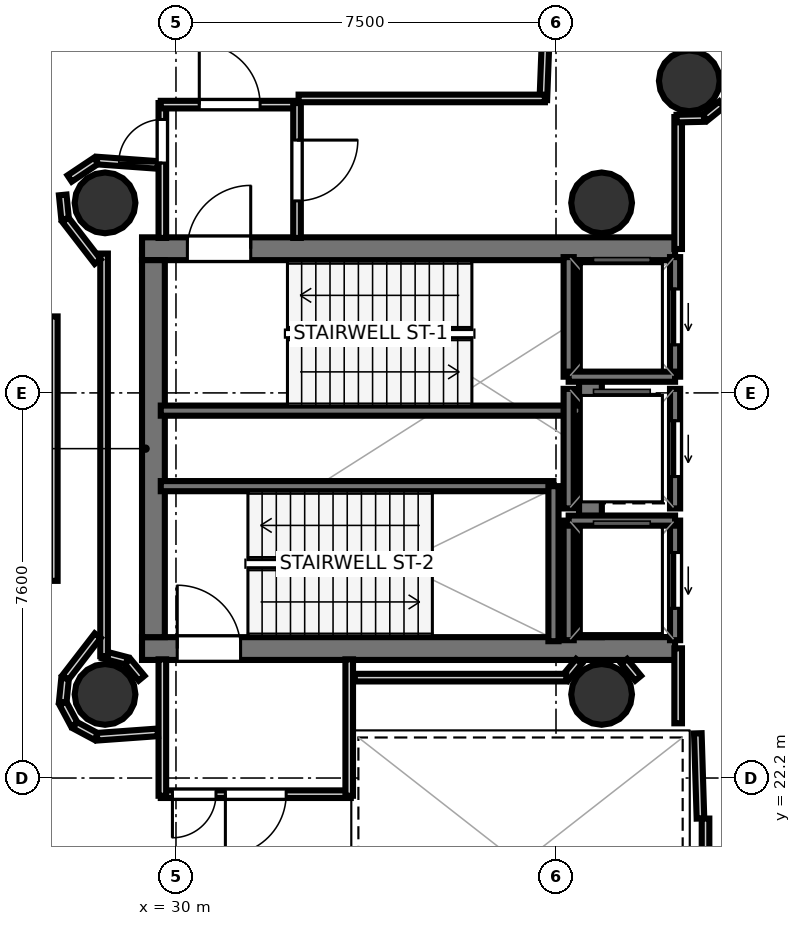
"""IFC4 building model, lengths in metres.
Left out: names, types, materials, properties, quantities, classifications, styles, units other than length and angle.
Written with IfcOpenShell. Run it as: python <this file> out.ifc"""

import sys

from ifc_helpers import new_model, si_unit, direction, frame, frame_2d, origin, origin_2d, place, context, subcontext, project, spatial, rectangle, hollow_circle, extrude, element, fill, save


model = new_model("IFC4")
c1 = context("Model", 3, precision=1e-05, world=origin(), true_north=direction((0.0, 1.0)))
c2 = subcontext(c1, "Body", "Model", "MODEL_VIEW")
j1 = project(units=[si_unit("LENGTHUNIT", "METRE"), si_unit("PLANEANGLEUNIT", "RADIAN")], contexts=[c1])
p1 = place(None, origin())
s1 = spatial("IfcSite", under=j1, at=p1, CompositionType="ELEMENT")
p2 = place(p1, origin())
s2 = spatial("IfcBuilding", under=s1, at=p2, CompositionType="ELEMENT")
p3 = place(p2, frame((0.0, 0.0, 229.9)))
s3 = spatial("IfcBuildingStorey", under=s2, at=p3, CompositionType="ELEMENT", Elevation=229.9)
p4 = place(p3, frame((29.33, 32.645, 0.0), z_axis=(0.0, 0.0, 1.0), x_axis=(1.0, 0.0, 0.0)))
e1 = element("IfcWall", 1, at=p4, inside=s3, PredefinedType="SHEAR", context=c2, shape_type="SweptSolid", body=[
    extrude(rectangle(XDim=10.52, YDim=0.45, at=frame_2d((5.26, 0.0))), origin(), (0.0, 0.0, 1.0), 4.38),
])
p5 = place(p4, frame((0.895, 0.0, 0.0)))
e2 = element("IfcOpeningElement", 2, at=p5, cuts=e1, PredefinedType="OPENING", context=c2, shape_type="SweptSolid", body=[
    extrude(rectangle(XDim=1.25, YDim=2.15, at=frame_2d((0.625, 1.075))), frame((0.0, 0.235, 0.0), z_axis=(0.0, -1.0, 0.0), x_axis=(1.0, 0.0, 0.0)), (0.0, 0.0, 1.0), 0.47),
])
p6 = place(p3, frame((29.33, 24.755, 0.0), z_axis=(0.0, 0.0, 1.0), x_axis=(1.0, 0.0, 0.0)))
e3 = element("IfcWall", 3, at=p6, inside=s3, PredefinedType="SHEAR", context=c2, shape_type="SweptSolid", body=[
    extrude(rectangle(XDim=10.52, YDim=0.45, at=frame_2d((5.26, 0.0))), origin(), (0.0, 0.0, 1.0), 4.38),
])
p7 = place(p6, frame((0.695, 0.0, 0.0)))
e4 = element("IfcOpeningElement", 4, at=p7, cuts=e3, PredefinedType="OPENING", context=c2, shape_type="SweptSolid", body=[
    extrude(rectangle(XDim=1.25, YDim=2.15, at=frame_2d((0.625, 1.075))), frame((0.0, 0.235, 0.0), z_axis=(0.0, -1.0, 0.0), x_axis=(1.0, 0.0, 0.0)), (0.0, 0.0, 1.0), 0.47),
])
for number, where, z_axis, x_axis in (
    (5, (29.555, 24.98, 0.0), (0.0, 0.0, 1.0), (0.0, 1.0, 0.0)),
    (6, (38.18, 24.98, 0.0), (0.0, 0.0, 1.0), (0.0, 1.0, 0.0)),
):
    element("IfcWall", number, at=place(p3, frame(where, z_axis=z_axis, x_axis=x_axis)), inside=s3, PredefinedType="SHEAR", context=c2, shape_type="SweptSolid", body=[
        extrude(rectangle(XDim=7.44, YDim=0.45, at=frame_2d((3.72, 0.0))), origin(), (0.0, 0.0, 1.0), 4.38),
    ])
for number, where, z_axis, x_axis in (
    (7, (28.6, 33.55, 0.0), (0.0, 0.0, 1.0), (1.0, 0.0, 0.0)),
    (8, (28.6, 23.85, 0.0), (0.0, 0.0, 1.0), (1.0, 0.0, 0.0)),
    (9, (38.4, 33.55, 0.0), (0.0, 0.0, 1.0), (1.0, 0.0, 0.0)),
    (10, (38.4, 23.85, 0.0), (0.0, 0.0, 1.0), (1.0, 0.0, 0.0)),
    (11, (40.131, 35.958, 0.0), (0.0, 0.0, 1.0), (1.0, 0.0, 0.0)),
):
    element("IfcColumn", number, at=place(p3, frame(where, z_axis=z_axis, x_axis=x_axis)), inside=s3, PredefinedType="COLUMN", context=c2, shape_type="SweptSolid", body=[
        extrude(hollow_circle(Radius=0.6, WallThickness=0.03, at=origin_2d()), origin(), (0.0, 0.0, 1.0), 4.6),
    ])
p8 = place(p3, frame((29.7, 29.45, 0.0), z_axis=(0.0, 0.0, 1.0), x_axis=(1.0, 0.0, 0.0)))
e12 = element("IfcWall", 12, at=p8, inside=s3, PredefinedType="SOLIDWALL", context=c2, shape_type="SweptSolid", body=[
    extrude(rectangle(XDim=8.3, YDim=0.2, at=frame_2d((4.15, 0.0))), origin(), (0.0, 0.0, 1.0), 4.38),
])
p9 = place(p3, frame((29.7, 27.96, 0.0), z_axis=(0.0, 0.0, 1.0), x_axis=(1.0, 0.0, 0.0)))
e13 = element("IfcWall", 13, at=p9, inside=s3, PredefinedType="SOLIDWALL", context=c2, shape_type="SweptSolid", body=[
    extrude(rectangle(XDim=7.75, YDim=0.2, at=frame_2d((3.875, 0.0))), origin(), (0.0, 0.0, 1.0), 4.38),
])
p10 = place(p3, frame((37.45, 24.9, 0.0), z_axis=(0.0, 0.0, 1.0), x_axis=(0.0, 1.0, 0.0)))
e14 = element("IfcWall", 14, at=p10, inside=s3, PredefinedType="SOLIDWALL", context=c2, shape_type="SweptSolid", body=[
    extrude(rectangle(XDim=3.06, YDim=0.2, at=frame_2d((1.53, 0.0))), origin(), (0.0, 0.0, 1.0), 4.38),
])
p11 = place(p3, frame((39.85, 30.12, 0.0), z_axis=(0.0, 0.0, 1.0), x_axis=(0.0, 1.0, 0.0)))
e15 = element("IfcWall", 15, at=p11, inside=s3, PredefinedType="SOLIDWALL", context=c2, shape_type="SweptSolid", body=[
    extrude(rectangle(XDim=2.36, YDim=0.2, at=frame_2d((1.18, 0.0))), origin(), (0.0, 0.0, 1.0), 4.38),
])
p12 = place(p11, frame((0.63, 0.0, 0.0)))
e16 = element("IfcOpeningElement", 16, at=p12, cuts=e15, PredefinedType="OPENING", context=c2, shape_type="SweptSolid", body=[
    extrude(rectangle(XDim=1.1, YDim=2.15, at=frame_2d((0.55, 1.075))), frame((0.0, 0.11, 0.0), z_axis=(0.0, -1.0, 0.0), x_axis=(1.0, 0.0, 0.0)), (0.0, 0.0, 1.0), 0.22),
])
p13 = place(p3, frame((37.75, 30.12, 0.0), z_axis=(0.0, 0.0, 1.0), x_axis=(0.0, 1.0, 0.0)))
e17 = element("IfcWall", 17, at=p13, inside=s3, PredefinedType="SOLIDWALL", context=c2, shape_type="SweptSolid", body=[
    extrude(rectangle(XDim=2.36, YDim=0.2, at=frame_2d((1.18, 0.0))), origin(), (0.0, 0.0, 1.0), 4.38),
])
p14 = place(p3, frame((37.75, 30.12, 0.0), z_axis=(0.0, 0.0, 1.0), x_axis=(1.0, 0.0, 0.0)))
e18 = element("IfcWall", 18, at=p14, inside=s3, PredefinedType="SOLIDWALL", context=c2, shape_type="SweptSolid", body=[
    extrude(rectangle(XDim=2.1, YDim=0.2, at=frame_2d((1.05, 0.0))), origin(), (0.0, 0.0, 1.0), 4.38),
])
p15 = place(p3, frame((39.85, 24.92, 0.0), z_axis=(0.0, 0.0, 1.0), x_axis=(0.0, 1.0, 0.0)))
e19 = element("IfcWall", 19, at=p15, inside=s3, PredefinedType="SOLIDWALL", context=c2, shape_type="SweptSolid", body=[
    extrude(rectangle(XDim=2.36, YDim=0.2, at=frame_2d((1.18, 0.0))), origin(), (0.0, 0.0, 1.0), 4.38),
])
p16 = place(p15, frame((0.63, 0.0, 0.0)))
e20 = element("IfcOpeningElement", 20, at=p16, cuts=e19, PredefinedType="OPENING", context=c2, shape_type="SweptSolid", body=[
    extrude(rectangle(XDim=1.1, YDim=2.15, at=frame_2d((0.55, 1.075))), frame((0.0, 0.11, 0.0), z_axis=(0.0, -1.0, 0.0), x_axis=(1.0, 0.0, 0.0)), (0.0, 0.0, 1.0), 0.22),
])
p17 = place(p3, frame((37.75, 24.92, 0.0), z_axis=(0.0, 0.0, 1.0), x_axis=(0.0, 1.0, 0.0)))
e21 = element("IfcWall", 21, at=p17, inside=s3, PredefinedType="SOLIDWALL", context=c2, shape_type="SweptSolid", body=[
    extrude(rectangle(XDim=2.36, YDim=0.2, at=frame_2d((1.18, 0.0))), origin(), (0.0, 0.0, 1.0), 4.38),
])
p18 = place(p3, frame((37.75, 27.28, 0.0), z_axis=(0.0, 0.0, 1.0), x_axis=(1.0, 0.0, 0.0)))
e22 = element("IfcWall", 22, at=p18, inside=s3, PredefinedType="SOLIDWALL", context=c2, shape_type="SweptSolid", body=[
    extrude(rectangle(XDim=2.1, YDim=0.2, at=frame_2d((1.05, 0.0))), origin(), (0.0, 0.0, 1.0), 4.38),
])
p19 = place(p3, frame((39.85, 27.52, 0.0), z_axis=(0.0, 0.0, 1.0), x_axis=(0.0, 1.0, 0.0)))
e23 = element("IfcWall", 23, at=p19, inside=s3, PredefinedType="SOLIDWALL", context=c2, shape_type="SweptSolid", body=[
    extrude(rectangle(XDim=2.36, YDim=0.2, at=frame_2d((1.18, 0.0))), origin(), (0.0, 0.0, 1.0), 4.38),
])
p20 = place(p19, frame((0.63, 0.0, 0.0)))
e24 = element("IfcOpeningElement", 24, at=p20, cuts=e23, PredefinedType="OPENING", context=c2, shape_type="SweptSolid", body=[
    extrude(rectangle(XDim=1.1, YDim=2.15, at=frame_2d((0.55, 1.075))), frame((0.0, 0.11, 0.0), z_axis=(0.0, -1.0, 0.0), x_axis=(1.0, 0.0, 0.0)), (0.0, 0.0, 1.0), 0.22),
])
p21 = place(p3, frame((37.75, 27.52, 0.0), z_axis=(0.0, 0.0, 1.0), x_axis=(0.0, 1.0, 0.0)))
e25 = element("IfcWall", 25, at=p21, inside=s3, PredefinedType="SOLIDWALL", context=c2, shape_type="SweptSolid", body=[
    extrude(rectangle(XDim=2.36, YDim=0.2, at=frame_2d((1.18, 0.0))), origin(), (0.0, 0.0, 1.0), 4.38),
])
p22 = place(p3, frame((29.731, 32.858, 0.0), z_axis=(0.0, 0.0, 1.0), x_axis=(0.0, 1.0, 0.0)))
e26 = element("IfcWall", 26, at=p22, inside=s3, PredefinedType="PARTITIONING", context=c2, shape_type="SweptSolid", body=[
    extrude(rectangle(XDim=2.662, YDim=0.15, at=frame_2d((1.331, 0.0))), origin(), (0.0, 0.0, 1.0), 2.9),
])
p23 = place(p22, frame((1.478, 0.0, 0.0)))
e27 = element("IfcOpeningElement", 27, at=p23, cuts=e26, PredefinedType="OPENING", context=c2, shape_type="SweptSolid", body=[
    extrude(rectangle(XDim=0.86, YDim=2.05, at=frame_2d((0.43, 1.025))), frame((0.0, 0.085, 0.0), z_axis=(0.0, -1.0, 0.0), x_axis=(1.0, 0.0, 0.0)), (0.0, 0.0, 1.0), 0.17),
])
p24 = place(p3, frame((29.7, 35.489, 0.0), z_axis=(0.0, 0.0, 1.0), x_axis=(1.0, 0.0, 0.0)))
e28 = element("IfcWall", 28, at=p24, inside=s3, PredefinedType="PARTITIONING", context=c2, shape_type="SweptSolid", body=[
    extrude(rectangle(XDim=2.72, YDim=0.15, at=frame_2d((1.36, 0.0))), origin(), (0.0, 0.0, 1.0), 2.9),
])
p25 = place(p24, frame((0.76, 0.0, 0.0)))
e29 = element("IfcOpeningElement", 29, at=p25, cuts=e28, PredefinedType="OPENING", context=c2, shape_type="SweptSolid", body=[
    extrude(rectangle(XDim=1.2, YDim=2.15, at=frame_2d((0.6, 1.075))), frame((0.0, 0.085, 0.0), z_axis=(0.0, -1.0, 0.0), x_axis=(1.0, 0.0, 0.0)), (0.0, 0.0, 1.0), 0.17),
])
p26 = place(p3, frame((32.389, 35.52, 0.0), z_axis=(0.0, 0.0, 1.0), x_axis=(0.0, -1.0, 0.0)))
e30 = element("IfcWall", 30, at=p26, inside=s3, PredefinedType="PARTITIONING", context=c2, shape_type="SweptSolid", body=[
    extrude(rectangle(XDim=2.662, YDim=0.15, at=frame_2d((1.331, 0.0))), origin(), (0.0, 0.0, 1.0), 2.9),
])
p27 = place(p26, frame((0.731, 0.0, 0.0)))
e31 = element("IfcOpeningElement", 31, at=p27, cuts=e30, PredefinedType="OPENING", context=c2, shape_type="SweptSolid", body=[
    extrude(rectangle(XDim=1.2, YDim=2.15, at=frame_2d((0.6, 1.075))), frame((0.0, 0.085, 0.0), z_axis=(0.0, -1.0, 0.0), x_axis=(1.0, 0.0, 0.0)), (0.0, 0.0, 1.0), 0.17),
])
p28 = place(p3, frame((33.45, 21.881, 0.0), z_axis=(0.0, 0.0, 1.0), x_axis=(-1.0, 0.0, 0.0)))
e32 = element("IfcWall", 32, at=p28, inside=s3, PredefinedType="PARTITIONING", context=c2, shape_type="SweptSolid", body=[
    extrude(rectangle(XDim=3.75, YDim=0.15, at=frame_2d((1.875, 0.0))), origin(), (0.0, 0.0, 1.0), 2.9),
])
p29 = place(p28, frame((1.275, 0.0, 0.0)))
e33 = element("IfcOpeningElement", 33, at=p29, cuts=e32, PredefinedType="OPENING", context=c2, shape_type="SweptSolid", body=[
    extrude(rectangle(XDim=1.2, YDim=2.15, at=frame_2d((0.6, 1.075))), frame((0.0, 0.085, 0.0), z_axis=(0.0, -1.0, 0.0), x_axis=(1.0, 0.0, 0.0)), (0.0, 0.0, 1.0), 0.17),
])
p30 = place(p28, frame((2.66, 0.0, 0.0)))
e34 = element("IfcOpeningElement", 34, at=p30, cuts=e32, PredefinedType="OPENING", context=c2, shape_type="SweptSolid", body=[
    extrude(rectangle(XDim=0.86, YDim=2.05, at=frame_2d((0.43, 1.025))), frame((0.0, 0.085, 0.0), z_axis=(0.0, -1.0, 0.0), x_axis=(1.0, 0.0, 0.0)), (0.0, 0.0, 1.0), 0.17),
])
for number, where, z_axis, x_axis in (
    (35, (29.731, 21.85, 0.0), (0.0, 0.0, 1.0), (0.0, 1.0, 0.0)),
    (36, (33.419, 24.542, 0.0), (0.0, 0.0, 1.0), (0.0, -1.0, 0.0)),
):
    element("IfcWall", number, at=place(p3, frame(where, z_axis=z_axis, x_axis=x_axis)), inside=s3, PredefinedType="PARTITIONING", context=c2, shape_type="SweptSolid", body=[
        extrude(rectangle(XDim=2.692, YDim=0.15, at=frame_2d((1.346, 0.0))), origin(), (0.0, 0.0, 1.0), 2.9),
    ])
p31 = place(p3, frame((40.351, 21.401, 0.0), z_axis=(0.0, 0.0, 1.0), x_axis=(-0.031058045979, 0.999517582527, 0.0)))
e37 = element("IfcWall", 37, at=p31, inside=s3, PredefinedType="PARTITIONING", context=c2, shape_type="SweptSolid", body=[
    extrude(rectangle(XDim=1.682, YDim=0.15, at=frame_2d((0.841, 0.0))), origin(), (0.0, 0.0, 1.0), 2.9),
])
p32 = place(p3, frame((39.911, 23.28, 0.0), z_axis=(0.0, 0.0, 1.0), x_axis=(0.0, 1.0, 0.0)))
e38 = element("IfcWall", 38, at=p32, inside=s3, PredefinedType="PARTITIONING", context=c2, shape_type="SweptSolid", body=[
    extrude(rectangle(XDim=1.48, YDim=0.15, at=frame_2d((0.74, 0.0))), origin(), (0.0, 0.0, 1.0), 2.9),
])
p33 = place(p3, frame((39.911, 32.64, 0.0), z_axis=(0.0, 0.0, 1.0), x_axis=(0.0, 1.0, 0.0)))
e39 = element("IfcWall", 39, at=p33, inside=s3, PredefinedType="PARTITIONING", context=c2, shape_type="SweptSolid", body=[
    extrude(rectangle(XDim=2.604, YDim=0.15, at=frame_2d((1.302, 0.0))), origin(), (0.0, 0.0, 1.0), 2.9),
])
p34 = place(p3, frame((39.881, 35.213, 0.0), z_axis=(0.0, 0.0, 1.0), x_axis=(0.999756500784, 0.02206669754, 0.0)))
e40 = element("IfcWall", 40, at=p34, inside=s3, PredefinedType="PARTITIONING", context=c2, shape_type="SweptSolid", body=[
    extrude(rectangle(XDim=0.542, YDim=0.15, at=frame_2d((0.271, 0.0))), origin(), (0.0, 0.0, 1.0), 2.9),
])
p35 = place(p3, frame((40.441, 35.232, 0.0), z_axis=(0.0, 0.0, 1.0), x_axis=(0.778714564707, 0.627378376033, 0.0)))
e41 = element("IfcWall", 41, at=p35, inside=s3, PredefinedType="PARTITIONING", context=c2, shape_type="SweptSolid", body=[
    extrude(rectangle(XDim=0.421, YDim=0.15, at=frame_2d((0.21, 0.0))), origin(), (0.0, 0.0, 1.0), 2.9),
])
p36 = place(p3, frame((40.451, 18.08, 0.0), z_axis=(0.0, 0.0, 1.0), x_axis=(0.0, 1.0, 0.0)))
e42 = element("IfcWall", 42, at=p36, inside=s3, PredefinedType="PARTITIONING", context=c2, shape_type="SweptSolid", body=[
    extrude(rectangle(XDim=3.32, YDim=0.15, at=frame_2d((1.66, 0.0))), origin(), (0.0, 0.0, 1.0), 2.9),
])
p37 = place(p3, frame((29.321, 24.17, 0.0), z_axis=(0.0, 0.0, 1.0), x_axis=(-0.638008265708, 0.770029514296, 0.0)))
e43 = element("IfcWall", 43, at=p37, inside=s3, PredefinedType="PARTITIONING", context=c2, shape_type="SweptSolid", body=[
    extrude(rectangle(XDim=0.431, YDim=0.15, at=frame_2d((0.215, 0.0))), origin(), (0.0, 0.0, 1.0), 2.9),
])
p38 = place(p3, frame((29.03, 24.512, 0.0), z_axis=(0.0, 0.0, 1.0), x_axis=(-0.967681003213, 0.252177469296, 0.0)))
e44 = element("IfcWall", 44, at=p38, inside=s3, PredefinedType="PARTITIONING", context=c2, shape_type="SweptSolid", body=[
    extrude(rectangle(XDim=0.488, YDim=0.15, at=frame_2d((0.244, 0.0))), origin(), (0.0, 0.0, 1.0), 2.9),
])
p39 = place(p3, frame((28.581, 24.605, 0.0), z_axis=(0.0, 0.0, 1.0), x_axis=(0.0, 1.0, 0.0)))
e45 = element("IfcWall", 45, at=p39, inside=s3, PredefinedType="PARTITIONING", context=c2, shape_type="SweptSolid", body=[
    extrude(rectangle(XDim=7.945, YDim=0.15, at=frame_2d((3.973, 0.0))), origin(), (0.0, 0.0, 1.0), 2.9),
])
for number, where, z_axis, x_axis in (
    (46, (39.121, 24.17, 0.0), (0.0, 0.0, 1.0), (-0.638, 0.77, 0.0)),
    (47, (37.954, 24.502, 0.0), (0.0, 0.0, 1.0), (-0.638, -0.77, 0.0)),
):
    element("IfcWall", number, at=place(p3, frame(where, z_axis=z_axis, x_axis=x_axis)), inside=s3, PredefinedType="PARTITIONING", context=c2, shape_type="SweptSolid", body=[
        extrude(rectangle(XDim=0.431, YDim=0.15, at=frame_2d((0.215, 0.0))), origin(), (0.0, 0.0, 1.0), 2.9),
    ])
p40 = place(p3, frame((37.703, 24.181, 0.0), z_axis=(0.0, 0.0, 1.0), x_axis=(-1.0, 0.0, 0.0)))
e48 = element("IfcWall", 48, at=p40, inside=s3, PredefinedType="PARTITIONING", context=c2, shape_type="SweptSolid", body=[
    extrude(rectangle(XDim=4.173, YDim=0.15, at=frame_2d((2.086, 0.0))), origin(), (0.0, 0.0, 1.0), 2.9),
])
p41 = place(p3, frame((37.323, 37.516, 0.0), z_axis=(0.0, 0.0, 1.0), x_axis=(-0.03796327397, -0.999279135092, 0.0)))
e49 = element("IfcWall", 49, at=p41, inside=s3, PredefinedType="PARTITIONING", context=c2, shape_type="SweptSolid", body=[
    extrude(rectangle(XDim=1.936, YDim=0.15, at=frame_2d((0.968, 0.0))), origin(), (0.0, 0.0, 1.0), 2.9),
])
p42 = place(p3, frame((37.281, 35.611, 0.0), z_axis=(0.0, 0.0, 1.0), x_axis=(-0.999999994955, 0.000100446989, 0.0)))
e50 = element("IfcWall", 50, at=p42, inside=s3, PredefinedType="PARTITIONING", context=c2, shape_type="SweptSolid", body=[
    extrude(rectangle(XDim=4.861, YDim=0.15, at=frame_2d((2.431, 0.0))), origin(), (0.0, 0.0, 1.0), 2.9),
])
p43 = place(p3, frame((29.64, 34.299, 0.0), z_axis=(0.0, 0.0, 1.0), x_axis=(-0.997392224386, 0.072171675429, 0.0)))
e51 = element("IfcWall", 51, at=p43, inside=s3, PredefinedType="PARTITIONING", context=c2, shape_type="SweptSolid", body=[
    extrude(rectangle(XDim=1.201, YDim=0.15, at=frame_2d((0.601, 0.0))), origin(), (0.0, 0.0, 1.0), 2.9),
])
p44 = place(p3, frame((28.423, 34.38, 0.0), z_axis=(0.0, 0.0, 1.0), x_axis=(-0.831571279003, -0.555418047903, 0.0)))
e52 = element("IfcWall", 52, at=p44, inside=s3, PredefinedType="PARTITIONING", context=c2, shape_type="SweptSolid", body=[
    extrude(rectangle(XDim=0.628, YDim=0.15, at=frame_2d((0.314, 0.0))), origin(), (0.0, 0.0, 1.0), 2.9),
])
p45 = place(p3, frame((27.765, 33.707, 0.0), z_axis=(0.0, 0.0, 1.0), x_axis=(0.09797988837, -0.995188394966, 0.0)))
e53 = element("IfcWall", 53, at=p45, inside=s3, PredefinedType="PARTITIONING", context=c2, shape_type="SweptSolid", body=[
    extrude(rectangle(XDim=0.476, YDim=0.15, at=frame_2d((0.238, 0.0))), origin(), (0.0, 0.0, 1.0), 2.9),
])
p46 = place(p3, frame((27.818, 33.217, 0.0), z_axis=(0.0, 0.0, 1.0), x_axis=(0.610908182604, -0.791701454102, 0.0)))
e54 = element("IfcWall", 54, at=p46, inside=s3, PredefinedType="PARTITIONING", context=c2, shape_type="SweptSolid", body=[
    extrude(rectangle(XDim=1.044, YDim=0.15, at=frame_2d((0.522, 0.0))), origin(), (0.0, 0.0, 1.0), 2.9),
])
p47 = place(p3, frame((27.589, 31.309, 0.0), z_axis=(0.0, 0.0, 1.0), x_axis=(0.0, -1.0, 0.0)))
e55 = element("IfcWall", 55, at=p47, inside=s3, PredefinedType="PARTITIONING", context=c2, shape_type="SweptSolid", body=[
    extrude(rectangle(XDim=5.218, YDim=0.15, at=frame_2d((2.609, 0.0))), origin(), (0.0, 0.0, 1.0), 2.9),
])
p48 = place(p3, frame((28.456, 25.009, 0.0), z_axis=(0.0, 0.0, 1.0), x_axis=(-0.610908182604, -0.791701454102, 0.0)))
e56 = element("IfcWall", 56, at=p48, inside=s3, PredefinedType="PARTITIONING", context=c2, shape_type="SweptSolid", body=[
    extrude(rectangle(XDim=1.044, YDim=0.15, at=frame_2d((0.522, 0.0))), origin(), (0.0, 0.0, 1.0), 2.9),
])
p49 = place(p3, frame((27.812, 24.167, 0.0), z_axis=(0.0, 0.0, 1.0), x_axis=(-0.09797988837, -0.995188394966, 0.0)))
e57 = element("IfcWall", 57, at=p49, inside=s3, PredefinedType="PARTITIONING", context=c2, shape_type="SweptSolid", body=[
    extrude(rectangle(XDim=0.476, YDim=0.15, at=frame_2d((0.238, 0.0))), origin(), (0.0, 0.0, 1.0), 2.9),
])
for number, where, z_axis, x_axis in (
    (58, (27.768, 23.675, 0.0), (0.0, 0.0, 1.0), (0.472, -0.882, 0.0)),
    (59, (28.006, 23.243, 0.0), (0.0, 0.0, 1.0), (0.882, -0.472, 0.0)),
):
    element("IfcWall", number, at=place(p3, frame(where, z_axis=z_axis, x_axis=x_axis)), inside=s3, PredefinedType="PARTITIONING", context=c2, shape_type="SweptSolid", body=[
        extrude(rectangle(XDim=0.476, YDim=0.15, at=frame_2d((0.238, 0.0))), origin(), (0.0, 0.0, 1.0), 2.9),
    ])
p50 = place(p3, frame((28.442, 23.015, 0.0), z_axis=(0.0, 0.0, 1.0), x_axis=(0.99740683837, 0.07196942943, 0.0)))
e60 = element("IfcWall", 60, at=p50, inside=s3, PredefinedType="PARTITIONING", context=c2, shape_type="SweptSolid", body=[
    extrude(rectangle(XDim=1.201, YDim=0.15, at=frame_2d((0.601, 0.0))), origin(), (0.0, 0.0, 1.0), 2.9),
])
p51 = place(p5, origin())
e61 = element("IfcDoor", 61, at=p51, inside=s3, OperationType="SINGLE_SWING_RIGHT", PredefinedType="DOOR", context=c2, shape_type="SweptSolid", body=[
    extrude(rectangle(XDim=1.25, YDim=2.15, at=frame_2d((0.625, 1.075))), frame((0.0, 0.025, 0.0), z_axis=(0.0, -1.0, 0.0), x_axis=(1.0, 0.0, 0.0)), (0.0, 0.0, 1.0), 0.05),
])
fill(e2, e61)
p52 = place(p7, origin())
e62 = element("IfcDoor", 62, at=p52, inside=s3, OperationType="SINGLE_SWING_LEFT", PredefinedType="DOOR", context=c2, shape_type="SweptSolid", body=[
    extrude(rectangle(XDim=1.25, YDim=2.15, at=frame_2d((0.625, 1.075))), frame((0.0, 0.025, 0.0), z_axis=(0.0, -1.0, 0.0), x_axis=(1.0, 0.0, 0.0)), (0.0, 0.0, 1.0), 0.05),
])
fill(e4, e62)
p53 = place(p12, origin())
e63 = element("IfcDoor", 63, at=p53, inside=s3, OperationType="SLIDING_TO_LEFT", PredefinedType="DOOR", context=c2, shape_type="SweptSolid", body=[
    extrude(rectangle(XDim=1.1, YDim=2.15, at=frame_2d((0.55, 1.075))), frame((0.0, 0.025, 0.0), z_axis=(0.0, -1.0, 0.0), x_axis=(1.0, 0.0, 0.0)), (0.0, 0.0, 1.0), 0.05),
])
fill(e16, e63)
p54 = place(p16, origin())
e64 = element("IfcDoor", 64, at=p54, inside=s3, OperationType="SLIDING_TO_LEFT", PredefinedType="DOOR", context=c2, shape_type="SweptSolid", body=[
    extrude(rectangle(XDim=1.1, YDim=2.15, at=frame_2d((0.55, 1.075))), frame((0.0, 0.025, 0.0), z_axis=(0.0, -1.0, 0.0), x_axis=(1.0, 0.0, 0.0)), (0.0, 0.0, 1.0), 0.05),
])
fill(e20, e64)
p55 = place(p20, origin())
e65 = element("IfcDoor", 65, at=p55, inside=s3, OperationType="SLIDING_TO_LEFT", PredefinedType="DOOR", context=c2, shape_type="SweptSolid", body=[
    extrude(rectangle(XDim=1.1, YDim=2.15, at=frame_2d((0.55, 1.075))), frame((0.0, 0.025, 0.0), z_axis=(0.0, -1.0, 0.0), x_axis=(1.0, 0.0, 0.0)), (0.0, 0.0, 1.0), 0.05),
])
fill(e24, e65)
p56 = place(p25, origin())
e66 = element("IfcDoor", 66, at=p56, inside=s3, OperationType="SINGLE_SWING_LEFT", PredefinedType="DOOR", context=c2, shape_type="SweptSolid", body=[
    extrude(rectangle(XDim=1.2, YDim=2.15, at=frame_2d((0.6, 1.075))), frame((0.0, 0.025, 0.0), z_axis=(0.0, -1.0, 0.0), x_axis=(1.0, 0.0, 0.0)), (0.0, 0.0, 1.0), 0.05),
])
fill(e29, e66)
p57 = place(p29, origin())
e67 = element("IfcDoor", 67, at=p57, inside=s3, OperationType="SINGLE_SWING_RIGHT", PredefinedType="DOOR", context=c2, shape_type="SweptSolid", body=[
    extrude(rectangle(XDim=1.2, YDim=2.15, at=frame_2d((0.6, 1.075))), frame((0.0, 0.025, 0.0), z_axis=(0.0, -1.0, 0.0), x_axis=(1.0, 0.0, 0.0)), (0.0, 0.0, 1.0), 0.05),
])
fill(e33, e67)
p58 = place(p27, origin())
e68 = element("IfcDoor", 68, at=p58, inside=s3, OperationType="SINGLE_SWING_LEFT", PredefinedType="DOOR", context=c2, shape_type="SweptSolid", body=[
    extrude(rectangle(XDim=1.2, YDim=2.15, at=frame_2d((0.6, 1.075))), frame((0.0, 0.025, 0.0), z_axis=(0.0, -1.0, 0.0), x_axis=(1.0, 0.0, 0.0)), (0.0, 0.0, 1.0), 0.05),
])
fill(e31, e68)
p59 = place(p23, origin())
e69 = element("IfcDoor", 69, at=p59, inside=s3, OperationType="SINGLE_SWING_LEFT", PredefinedType="DOOR", context=c2, shape_type="SweptSolid", body=[
    extrude(rectangle(XDim=0.86, YDim=2.05, at=frame_2d((0.43, 1.025))), frame((0.0, 0.025, 0.0), z_axis=(0.0, -1.0, 0.0), x_axis=(1.0, 0.0, 0.0)), (0.0, 0.0, 1.0), 0.05),
])
fill(e27, e69)
p60 = place(p30, origin())
e70 = element("IfcDoor", 70, at=p60, inside=s3, OperationType="SINGLE_SWING_RIGHT", PredefinedType="DOOR", context=c2, shape_type="SweptSolid", body=[
    extrude(rectangle(XDim=0.86, YDim=2.05, at=frame_2d((0.43, 1.025))), frame((0.0, 0.025, 0.0), z_axis=(0.0, -1.0, 0.0), x_axis=(1.0, 0.0, 0.0)), (0.0, 0.0, 1.0), 0.05),
])
fill(e34, e70)
save(model, sys.argv[1])
